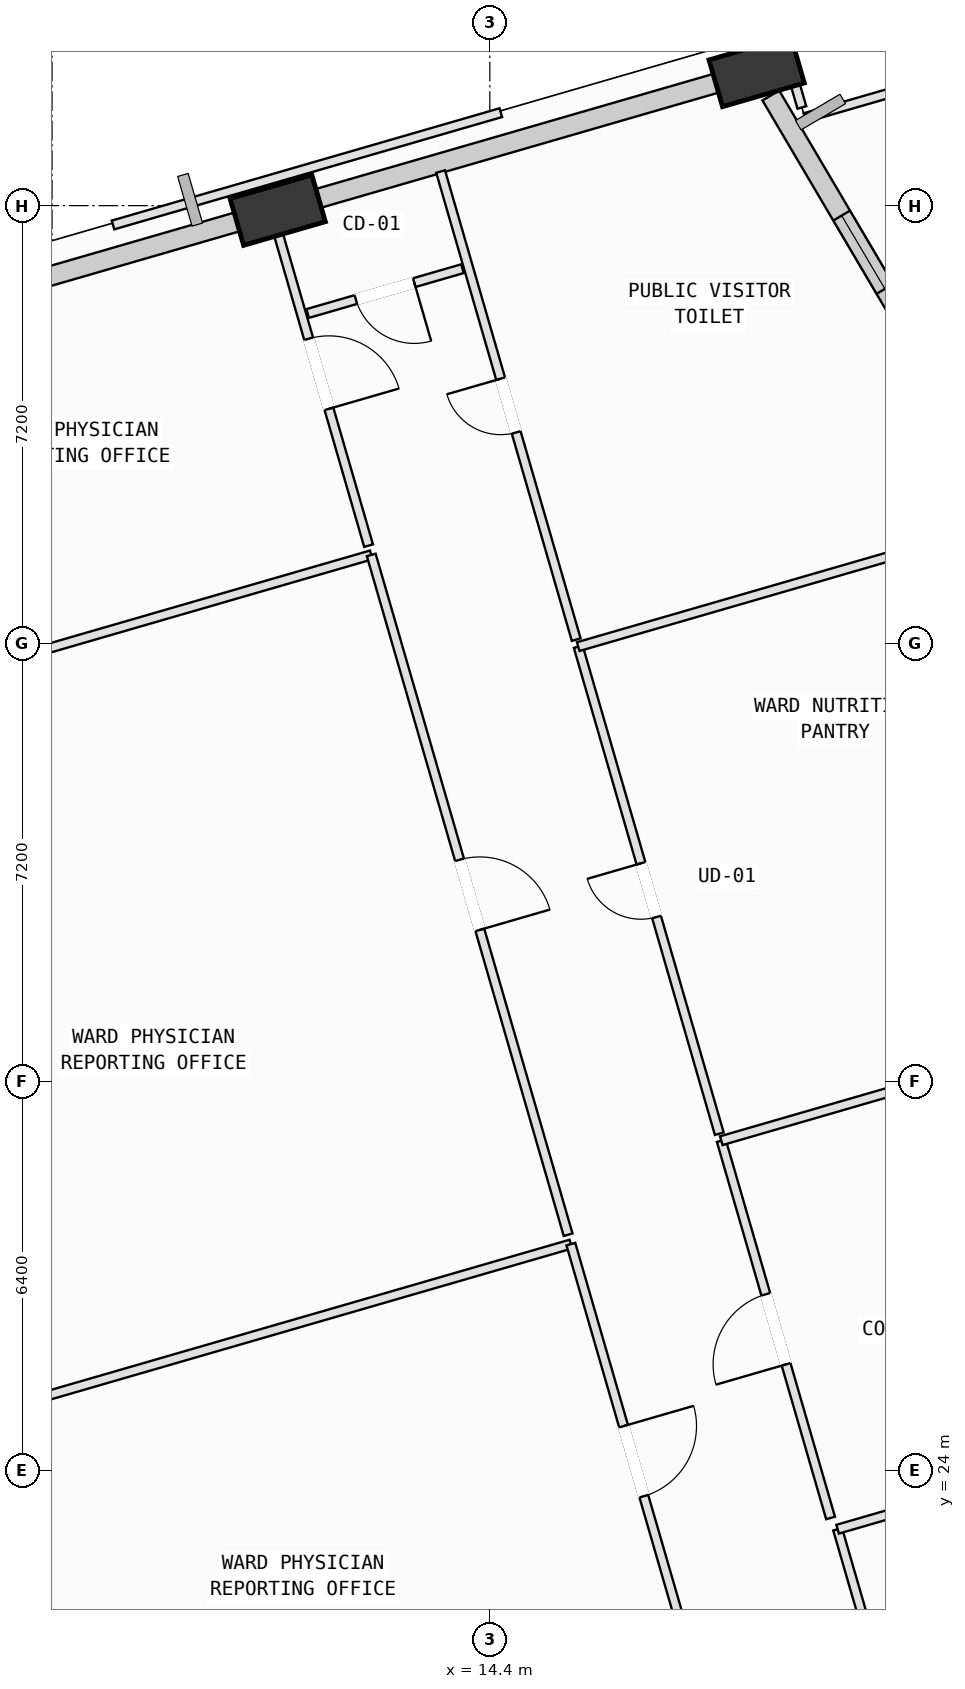
"""IFC4 building model, lengths in metres.
Left out: names, types, materials, properties, quantities, classifications, styles, units other than length and angle.
Written with IfcOpenShell. Run it as: python <this file> out.ifc"""

import sys

from ifc_helpers import new_model, si_unit, direction, frame, frame_2d, origin, origin_2d, place, context, subcontext, project, spatial, rectangle, extrude, element, fill, save


model = new_model("IFC4")
c1 = context("Model", 3, precision=1e-05, world=origin(), true_north=direction((0.0, 1.0)))
c2 = subcontext(c1, "Body", "Model", "MODEL_VIEW")
j1 = project(units=[si_unit("LENGTHUNIT", "METRE"), si_unit("PLANEANGLEUNIT", "RADIAN")], contexts=[c1])
p1 = place(None, origin())
s1 = spatial("IfcSite", under=j1, at=p1, CompositionType="ELEMENT")
p2 = place(p1, origin())
s2 = spatial("IfcBuilding", under=s1, at=p2, CompositionType="ELEMENT")
p3 = place(p2, frame((0.0, 0.0, 92.4)))
s3 = spatial("IfcBuildingStorey", under=s2, at=p3, CompositionType="ELEMENT", Elevation=92.4)
p4 = place(p3, frame((21.856, 41.804, 0.002), z_axis=(-0.069815910816, -0.049059829222, 0.996352784787), x_axis=(0.623114052348, 0.77782458417, 0.081962149972)))
e1 = element("IfcColumn", 1, at=p4, inside=s3, PredefinedType="COLUMN", context=c2, shape_type="SweptSolid", body=[
    extrude(rectangle(XDim=1.4, YDim=0.8, at=origin_2d()), origin(), (0.0, 0.0, 1.0), 4.011),
])
p5 = place(p3, frame((18.789, 47.006, 0.002), z_axis=(-0.091019912325, -0.061752669002, 0.993932584953), x_axis=(0.768058943677, -0.639647908294, 0.030594320596)))
e2 = element("IfcColumn", 2, at=p5, inside=s3, PredefinedType="COLUMN", context=c2, shape_type="SweptSolid", body=[
    extrude(rectangle(XDim=1.4, YDim=0.8, at=origin_2d()), origin(), (0.0, 0.0, 1.0), 4.021),
])
p6 = place(p3, frame((10.912, 44.726, 0.002), z_axis=(-0.081167514257, -0.094018532197, 0.992256191834), x_axis=(0.907432138666, -0.418775943189, 0.03454885123)))
e3 = element("IfcColumn", 3, at=p6, inside=s3, PredefinedType="COLUMN", context=c2, shape_type="SweptSolid", body=[
    extrude(rectangle(XDim=1.4, YDim=0.8, at=origin_2d()), origin(), (0.0, 0.0, 1.0), 4.028),
])
p7 = place(p3, frame((19.021, 46.612, 0.0), z_axis=(0.0, 0.0, 1.0), x_axis=(0.508026678392, -0.861341334223, 0.0)))
e4 = element("IfcWall", 4, at=p7, inside=s3, PredefinedType="SOLIDWALL", context=c2, shape_type="SweptSolid", body=[
    extrude(rectangle(XDim=5.129, YDim=0.32, at=frame_2d((2.564, 0.0))), origin(), (0.0, 0.0, 1.0), 3.165),
])
p8 = place(p7, frame((2.293, 0.0, 0.75)))
e5 = element("IfcOpeningElement", 5, at=p8, cuts=e4, PredefinedType="OPENING", context=c2, shape_type="SweptSolid", body=[
    extrude(rectangle(XDim=1.4, YDim=1.85, at=frame_2d((0.7, 0.925))), frame((0.0, 0.17, 0.0), z_axis=(0.0, -1.0, 0.0), x_axis=(1.0, 0.0, 0.0)), (0.0, 0.0, 1.0), 0.34),
])
p9 = place(p3, frame((11.169, 44.8, 0.0), z_axis=(0.0, 0.0, 1.0), x_axis=(0.960539342408, 0.278144156306, 0.0)))
e6 = element("IfcWall", 6, at=p9, inside=s3, PredefinedType="SOLIDWALL", context=c2, shape_type="SweptSolid", body=[
    extrude(rectangle(XDim=7.231, YDim=0.32, at=frame_2d((3.615, 0.0))), origin(), (0.0, 0.0, 1.0), 3.165),
])
p10 = place(p3, frame((3.269, 42.512, 0.0), z_axis=(0.0, 0.0, 1.0), x_axis=(0.960535698859, 0.278156738581, 0.0)))
e7 = element("IfcWall", 7, at=p10, inside=s3, PredefinedType="SOLIDWALL", context=c2, shape_type="SweptSolid", body=[
    extrude(rectangle(XDim=7.27, YDim=0.32, at=frame_2d((3.635, 0.0))), origin(), (0.0, 0.0, 1.0), 3.165),
])
p11 = place(p3, frame((5.2, 24.67, 0.0), z_axis=(0.0, 0.0, 1.0), x_axis=(0.960539065788, 0.27814511158, 0.0)))
e8 = element("IfcWall", 8, at=p11, inside=s3, PredefinedType="PARTITIONING", context=c2, shape_type="SweptSolid", body=[
    extrude(rectangle(XDim=10.966, YDim=0.15, at=frame_2d((5.483, 0.0))), origin(), (0.0, 0.0, 1.0), 3.78),
])
p12 = place(p3, frame((15.733, 27.72, 0.0), z_axis=(0.0, 0.0, 1.0), x_axis=(0.278098749545, -0.960552489717, 0.0)))
e9 = element("IfcWall", 9, at=p12, inside=s3, PredefinedType="PARTITIONING", context=c2, shape_type="SweptSolid", body=[
    extrude(rectangle(XDim=7.433, YDim=0.15, at=frame_2d((3.717, 0.0))), origin(), (0.0, 0.0, 1.0), 3.78),
])
p13 = place(p12, frame((3.117, 0.0, 0.0)))
e10 = element("IfcOpeningElement", 10, at=p13, cuts=e9, PredefinedType="OPENING", context=c2, shape_type="SweptSolid", body=[
    extrude(rectangle(XDim=1.2, YDim=2.15, at=frame_2d((0.6, 1.075))), frame((0.0, 0.085, 0.0), z_axis=(0.0, -1.0, 0.0), x_axis=(1.0, 0.0, 0.0)), (0.0, 0.0, 1.0), 0.17),
])
p14 = place(p3, frame((1.918, 36.005, 0.0), z_axis=(0.0, 0.0, 1.0), x_axis=(0.960532175089, 0.278168906636, 0.0)))
e11 = element("IfcWall", 11, at=p14, inside=s3, PredefinedType="PARTITIONING", context=c2, shape_type="SweptSolid", body=[
    extrude(rectangle(XDim=10.965, YDim=0.15, at=frame_2d((5.482, 0.0))), origin(), (0.0, 0.0, 1.0), 3.78),
])
p15 = place(p3, frame((12.45, 39.055, 0.0), z_axis=(0.0, 0.0, 1.0), x_axis=(0.278173677599, -0.960530793411, 0.0)))
e12 = element("IfcWall", 12, at=p15, inside=s3, PredefinedType="PARTITIONING", context=c2, shape_type="SweptSolid", body=[
    extrude(rectangle(XDim=11.64, YDim=0.15, at=frame_2d((5.82, 0.0))), origin(), (0.0, 0.0, 1.0), 3.78),
])
p16 = place(p15, frame((5.22, 0.0, 0.0)))
e13 = element("IfcOpeningElement", 13, at=p16, cuts=e12, PredefinedType="OPENING", context=c2, shape_type="SweptSolid", body=[
    extrude(rectangle(XDim=1.2, YDim=2.15, at=frame_2d((0.6, 1.075))), frame((0.0, 0.085, 0.0), z_axis=(0.0, -1.0, 0.0), x_axis=(1.0, 0.0, 0.0)), (0.0, 0.0, 1.0), 0.17),
])
p17 = place(p3, frame((10.205, 44.698, 0.0), z_axis=(0.0, 0.0, 1.0), x_axis=(0.960640226242, 0.277795528628, 0.0)))
e14 = element("IfcWall", 14, at=p17, inside=s3, PredefinedType="PARTITIONING", context=c2, shape_type="SweptSolid", body=[
    extrude(rectangle(XDim=0.587, YDim=0.15, at=frame_2d((0.293, 0.0))), origin(), (0.0, 0.0, 1.0), 3.78),
])
p18 = place(p3, frame((10.769, 44.861, 0.0), z_axis=(0.0, 0.0, 1.0), x_axis=(0.278143692162, -0.96053947681, 0.0)))
e15 = element("IfcWall", 15, at=p18, inside=s3, PredefinedType="PARTITIONING", context=c2, shape_type="SweptSolid", body=[
    extrude(rectangle(XDim=5.885, YDim=0.15, at=frame_2d((2.943, 0.0))), origin(), (0.0, 0.0, 1.0), 2.965),
])
p19 = place(p18, frame((2.343, 0.0, 0.0)))
e16 = element("IfcOpeningElement", 16, at=p19, cuts=e15, PredefinedType="OPENING", context=c2, shape_type="SweptSolid", body=[
    extrude(rectangle(XDim=1.2, YDim=2.15, at=frame_2d((0.6, 1.075))), frame((0.0, 0.085, 0.0), z_axis=(0.0, -1.0, 0.0), x_axis=(1.0, 0.0, 0.0)), (0.0, 0.0, 1.0), 0.17),
])
p20 = place(p3, frame((20.83, 20.58, 0.0), z_axis=(0.0, 0.0, 1.0), x_axis=(-0.278232310288, 0.960513811203, 0.0)))
e17 = element("IfcWall", 17, at=p20, inside=s3, PredefinedType="PARTITIONING", context=c2, shape_type="SweptSolid", body=[
    extrude(rectangle(XDim=2.552, YDim=0.15, at=frame_2d((1.276, 0.0))), origin(), (0.0, 0.0, 1.0), 3.78),
])
p21 = place(p3, frame((20.12, 23.031, 0.0), z_axis=(0.0, 0.0, 1.0), x_axis=(0.9605800129, 0.278003666913, 0.0)))
e18 = element("IfcWall", 18, at=p21, inside=s3, PredefinedType="PARTITIONING", context=c2, shape_type="SweptSolid", body=[
    extrude(rectangle(XDim=6.755, YDim=0.15, at=frame_2d((3.377, 0.0))), origin(), (0.0, 0.0, 1.0), 3.78),
])
p22 = place(p3, frame((20.004, 23.216, 0.0), z_axis=(0.0, 0.0, 1.0), x_axis=(-0.278163608181, 0.960533709499, 0.0)))
e19 = element("IfcWall", 19, at=p22, inside=s3, PredefinedType="PARTITIONING", context=c2, shape_type="SweptSolid", body=[
    extrude(rectangle(XDim=6.46, YDim=0.15, at=frame_2d((3.23, 0.0))), origin(), (0.0, 0.0, 1.0), 3.78),
])
p23 = place(p22, frame((2.63, 0.0, 0.0)))
e20 = element("IfcOpeningElement", 20, at=p23, cuts=e19, PredefinedType="OPENING", context=c2, shape_type="SweptSolid", body=[
    extrude(rectangle(XDim=1.2, YDim=2.15, at=frame_2d((0.6, 1.075))), frame((0.0, 0.085, 0.0), z_axis=(0.0, -1.0, 0.0), x_axis=(1.0, 0.0, 0.0)), (0.0, 0.0, 1.0), 0.17),
])
p24 = place(p3, frame((18.207, 29.421, 0.0), z_axis=(0.0, 0.0, 1.0), x_axis=(0.960519935436, 0.278211167335, 0.0)))
e21 = element("IfcWall", 21, at=p24, inside=s3, PredefinedType="PARTITIONING", context=c2, shape_type="SweptSolid", body=[
    extrude(rectangle(XDim=6.815, YDim=0.15, at=frame_2d((3.407, 0.0))), origin(), (0.0, 0.0, 1.0), 3.78),
])
p25 = place(p3, frame((18.174, 29.536, 0.0), z_axis=(0.0, 0.0, 1.0), x_axis=(-0.278171795837, 0.960531338375, 0.0)))
e22 = element("IfcWall", 22, at=p25, inside=s3, PredefinedType="PARTITIONING", context=c2, shape_type="SweptSolid", body=[
    extrude(rectangle(XDim=8.34, YDim=0.15, at=frame_2d((4.17, 0.0))), origin(), (0.0, 0.0, 1.0), 3.78),
])
p26 = place(p25, frame((3.71, 0.0, 0.0)))
e23 = element("IfcOpeningElement", 23, at=p26, cuts=e22, PredefinedType="OPENING", context=c2, shape_type="SweptSolid", body=[
    extrude(rectangle(XDim=0.92, YDim=2.1, at=frame_2d((0.46, 1.05))), frame((0.0, 0.085, 0.0), z_axis=(0.0, -1.0, 0.0), x_axis=(1.0, 0.0, 0.0)), (0.0, 0.0, 1.0), 0.17),
])
p27 = place(p3, frame((15.854, 37.547, 0.0), z_axis=(0.0, 0.0, 1.0), x_axis=(0.960519935436, 0.278211167335, 0.0)))
e24 = element("IfcWall", 24, at=p27, inside=s3, PredefinedType="PARTITIONING", context=c2, shape_type="SweptSolid", body=[
    extrude(rectangle(XDim=6.815, YDim=0.15, at=frame_2d((3.407, 0.0))), origin(), (0.0, 0.0, 1.0), 3.78),
])
p28 = place(p3, frame((15.821, 37.662, 0.0), z_axis=(0.0, 0.0, 1.0), x_axis=(-0.278211165239, 0.960519936043, 0.0)))
e25 = element("IfcWall", 25, at=p28, inside=s3, PredefinedType="PARTITIONING", context=c2, shape_type="SweptSolid", body=[
    extrude(rectangle(XDim=8.015, YDim=0.15, at=frame_2d((4.008, 0.0))), origin(), (0.0, 0.0, 1.0), 3.78),
])
p29 = place(p28, frame((3.548, 0.0, 0.0)))
e26 = element("IfcOpeningElement", 26, at=p29, cuts=e25, PredefinedType="OPENING", context=c2, shape_type="SweptSolid", body=[
    extrude(rectangle(XDim=0.92, YDim=2.1, at=frame_2d((0.46, 1.05))), frame((0.0, 0.085, 0.0), z_axis=(0.0, -1.0, 0.0), x_axis=(1.0, 0.0, 0.0)), (0.0, 0.0, 1.0), 0.17),
])
p30 = place(p3, frame((18.062, 46.994, 0.0), z_axis=(0.0, 0.0, 1.0), x_axis=(0.960516252311, 0.278223882956, 0.0)))
e27 = element("IfcWall", 27, at=p30, inside=s3, PredefinedType="PARTITIONING", context=c2, shape_type="SweptSolid", body=[
    extrude(rectangle(XDim=1.251, YDim=0.15, at=frame_2d((0.625, 0.0))), origin(), (0.0, 0.0, 1.0), 3.165),
])
p31 = place(p3, frame((19.278, 47.294, 0.0), z_axis=(0.0, 0.0, 1.0), x_axis=(0.277539652821, -0.960714182841, 0.0)))
e28 = element("IfcWall", 28, at=p31, inside=s3, PredefinedType="PARTITIONING", context=c2, shape_type="SweptSolid", body=[
    extrude(rectangle(XDim=0.915, YDim=0.15, at=frame_2d((0.458, 0.0))), origin(), (0.0, 0.0, 1.0), 3.78),
])
p32 = place(p3, frame((19.581, 46.247, 0.0), z_axis=(0.0, 0.0, 1.0), x_axis=(0.960642326739, 0.27778826483, 0.0)))
e29 = element("IfcWall", 29, at=p32, inside=s3, PredefinedType="PARTITIONING", context=c2, shape_type="SweptSolid", body=[
    extrude(rectangle(XDim=1.45, YDim=0.15, at=frame_2d((0.725, 0.0))), origin(), (0.0, 0.0, 1.0), 3.78),
])
p33 = place(p3, frame((13.95, 43.763, 0.0), z_axis=(0.0, 0.0, 1.0), x_axis=(-0.960526690824, -0.2781878434, 0.0)))
e30 = element("IfcWall", 30, at=p33, inside=s3, PredefinedType="PARTITIONING", context=c2, shape_type="SweptSolid", body=[
    extrude(rectangle(XDim=2.649, YDim=0.15, at=frame_2d((1.325, 0.0))), origin(), (0.0, 0.0, 1.0), 3.78),
])
p34 = place(p33, frame((0.825, 0.0, 0.0)))
e31 = element("IfcOpeningElement", 31, at=p34, cuts=e30, PredefinedType="OPENING", context=c2, shape_type="SweptSolid", body=[
    extrude(rectangle(XDim=1.0, YDim=2.12, at=frame_2d((0.5, 1.06))), frame((0.0, 0.085, 0.0), z_axis=(0.0, -1.0, 0.0), x_axis=(1.0, 0.0, 0.0)), (0.0, 0.0, 1.0), 0.17),
])
p35 = place(p3, frame((8.203, 44.482, 0.0), z_axis=(0.0, 0.0, 1.0), x_axis=(0.960529886678, 0.278176808521, 0.0)))
e32 = element("IfcWall", 32, at=p35, inside=s3, PredefinedType="PARTITIONING", context=c2, shape_type="SweptSolid", body=[
    extrude(rectangle(XDim=6.64, YDim=0.15, at=frame_2d((3.32, 0.0))), origin(), (0.0, 0.0, 1.0), 3.78),
])
p36 = place(p8, origin())
e33 = element("IfcWindow", 33, at=p36, inside=s3, PartitioningType="SINGLE_PANEL", PredefinedType="WINDOW", context=c2, shape_type="SweptSolid", body=[
    extrude(rectangle(XDim=1.4, YDim=1.85, at=frame_2d((0.7, 0.925))), frame((0.0, 0.03, 0.0), z_axis=(0.0, -1.0, 0.0), x_axis=(1.0, 0.0, 0.0)), (0.0, 0.0, 1.0), 0.06),
])
fill(e5, e33)
p37 = place(p13, origin())
e34 = element("IfcDoor", 34, at=p37, inside=s3, OperationType="SINGLE_SWING_LEFT", PredefinedType="DOOR", context=c2, shape_type="SweptSolid", body=[
    extrude(rectangle(XDim=1.2, YDim=2.15, at=frame_2d((0.6, 1.075))), frame((0.0, 0.025, 0.0), z_axis=(0.0, -1.0, 0.0), x_axis=(1.0, 0.0, 0.0)), (0.0, 0.0, 1.0), 0.05),
])
fill(e10, e34)
p38 = place(p16, origin())
e35 = element("IfcDoor", 35, at=p38, inside=s3, OperationType="SINGLE_SWING_RIGHT", PredefinedType="DOOR", context=c2, shape_type="SweptSolid", body=[
    extrude(rectangle(XDim=1.2, YDim=2.15, at=frame_2d((0.6, 1.075))), frame((0.0, 0.025, 0.0), z_axis=(0.0, -1.0, 0.0), x_axis=(1.0, 0.0, 0.0)), (0.0, 0.0, 1.0), 0.05),
])
fill(e13, e35)
p39 = place(p19, origin())
e36 = element("IfcDoor", 36, at=p39, inside=s3, OperationType="SINGLE_SWING_RIGHT", PredefinedType="DOOR", context=c2, shape_type="SweptSolid", body=[
    extrude(rectangle(XDim=1.2, YDim=2.15, at=frame_2d((0.6, 1.075))), frame((0.0, 0.025, 0.0), z_axis=(0.0, -1.0, 0.0), x_axis=(1.0, 0.0, 0.0)), (0.0, 0.0, 1.0), 0.05),
])
fill(e16, e36)
p40 = place(p23, origin())
e37 = element("IfcDoor", 37, at=p40, inside=s3, OperationType="SINGLE_SWING_LEFT", PredefinedType="DOOR", context=c2, shape_type="SweptSolid", body=[
    extrude(rectangle(XDim=1.2, YDim=2.15, at=frame_2d((0.6, 1.075))), frame((0.0, 0.025, 0.0), z_axis=(0.0, -1.0, 0.0), x_axis=(1.0, 0.0, 0.0)), (0.0, 0.0, 1.0), 0.05),
])
fill(e20, e37)
p41 = place(p26, origin())
e38 = element("IfcDoor", 38, at=p41, inside=s3, OperationType="SINGLE_SWING_RIGHT", PredefinedType="DOOR", context=c2, shape_type="SweptSolid", body=[
    extrude(rectangle(XDim=0.92, YDim=2.1, at=frame_2d((0.46, 1.05))), frame((0.0, 0.025, 0.0), z_axis=(0.0, -1.0, 0.0), x_axis=(1.0, 0.0, 0.0)), (0.0, 0.0, 1.0), 0.05),
])
fill(e23, e38)
p42 = place(p29, origin())
e39 = element("IfcDoor", 39, at=p42, inside=s3, OperationType="SINGLE_SWING_RIGHT", PredefinedType="DOOR", context=c2, shape_type="SweptSolid", body=[
    extrude(rectangle(XDim=0.92, YDim=2.1, at=frame_2d((0.46, 1.05))), frame((0.0, 0.025, 0.0), z_axis=(0.0, -1.0, 0.0), x_axis=(1.0, 0.0, 0.0)), (0.0, 0.0, 1.0), 0.05),
])
fill(e26, e39)
p43 = place(p34, origin())
e40 = element("IfcDoor", 40, at=p43, inside=s3, OperationType="SINGLE_SWING_LEFT", PredefinedType="DOOR", context=c2, shape_type="SweptSolid", body=[
    extrude(rectangle(XDim=1.0, YDim=2.12, at=frame_2d((0.5, 1.06))), frame((0.0, 0.025, 0.0), z_axis=(0.0, -1.0, 0.0), x_axis=(1.0, 0.0, 0.0)), (0.0, 0.0, 1.0), 0.05),
])
fill(e31, e40)
save(model, sys.argv[1])
